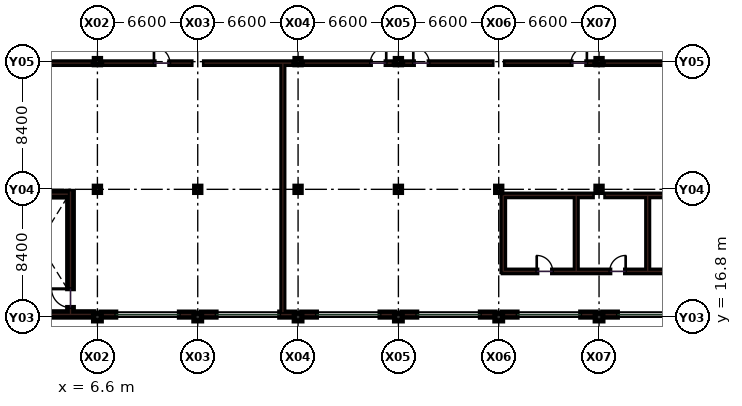
"""IFC4 building model, lengths in metres.
Left out: names, types, materials, properties, quantities, classifications, styles, units other than length and angle.
Written with IfcOpenShell. Run it as: python <this file> out.ifc"""

import sys

from ifc_helpers import new_model, si_unit, direction, frame, frame_2d, origin, origin_2d, place, context, subcontext, project, spatial, rectangle, extrude, element, fill, save


model = new_model("IFC4")
c1 = context("Model", 3, precision=1e-05, world=origin(), true_north=direction((0.0, 1.0)))
c2 = subcontext(c1, "Body", "Model", "MODEL_VIEW")
j1 = project(units=[si_unit("LENGTHUNIT", "METRE"), si_unit("PLANEANGLEUNIT", "RADIAN")], contexts=[c1])
p1 = place(None, origin())
s1 = spatial("IfcSite", under=j1, at=p1, CompositionType="ELEMENT")
p2 = place(p1, origin())
s2 = spatial("IfcBuilding", under=s1, at=p2, CompositionType="ELEMENT")
p3 = place(p2, frame((0.0, 0.0, 9.9)))
s3 = spatial("IfcBuildingStorey", under=s2, at=p3, CompositionType="ELEMENT", Elevation=9.9)
p4 = place(p3, frame((6.6, 16.8, 0.0), z_axis=(0.0, 0.0, 1.0), x_axis=(1.0, 0.0, 0.0)))
e1 = element("IfcColumn", 1, at=p4, inside=s3, PredefinedType="COLUMN", context=c2, shape_type="SweptSolid", body=[
    extrude(rectangle(XDim=0.5, YDim=0.5, at=origin_2d()), origin(), (0.0, 0.0, 1.0), 4.5),
])
for number, where, z_axis, x_axis in (
    (2, (6.6, 25.2, 0.0), (0.0, 0.0, 1.0), (1.0, 0.0, 0.0)),
    (3, (6.6, 33.6, 0.0), (0.0, 0.0, 1.0), (1.0, 0.0, 0.0)),
):
    element("IfcColumn", number, at=place(p3, frame(where, z_axis=z_axis, x_axis=x_axis)), inside=s3, PredefinedType="COLUMN", context=c2, shape_type="SweptSolid", body=[
        extrude(rectangle(XDim=0.4, YDim=0.4, at=origin_2d()), origin(), (0.0, 0.0, 1.0), 4.5),
    ])
p5 = place(p3, frame((13.2, 16.8, 0.0), z_axis=(0.0, 0.0, 1.0), x_axis=(1.0, 0.0, 0.0)))
e4 = element("IfcColumn", 4, at=p5, inside=s3, PredefinedType="COLUMN", context=c2, shape_type="SweptSolid", body=[
    extrude(rectangle(XDim=0.5, YDim=0.5, at=origin_2d()), origin(), (0.0, 0.0, 1.0), 4.5),
])
p6 = place(p3, frame((13.2, 25.2, 0.0), z_axis=(0.0, 0.0, 1.0), x_axis=(1.0, 0.0, 0.0)))
e5 = element("IfcColumn", 5, at=p6, inside=s3, PredefinedType="COLUMN", context=c2, shape_type="SweptSolid", body=[
    extrude(rectangle(XDim=0.4, YDim=0.4, at=origin_2d()), origin(), (0.0, 0.0, 1.0), 4.5),
])
p7 = place(p3, frame((19.8, 16.8, 0.0), z_axis=(0.0, 0.0, 1.0), x_axis=(1.0, 0.0, 0.0)))
e6 = element("IfcColumn", 6, at=p7, inside=s3, PredefinedType="COLUMN", context=c2, shape_type="SweptSolid", body=[
    extrude(rectangle(XDim=0.5, YDim=0.5, at=origin_2d()), origin(), (0.0, 0.0, 1.0), 4.5),
])
for number, where, z_axis, x_axis in (
    (7, (19.8, 25.2, 0.0), (0.0, 0.0, 1.0), (1.0, 0.0, 0.0)),
    (8, (19.8, 33.6, 0.0), (0.0, 0.0, 1.0), (1.0, 0.0, 0.0)),
):
    element("IfcColumn", number, at=place(p3, frame(where, z_axis=z_axis, x_axis=x_axis)), inside=s3, PredefinedType="COLUMN", context=c2, shape_type="SweptSolid", body=[
        extrude(rectangle(XDim=0.4, YDim=0.4, at=origin_2d()), origin(), (0.0, 0.0, 1.0), 4.5),
    ])
p8 = place(p3, frame((26.4, 16.8, 0.0), z_axis=(0.0, 0.0, 1.0), x_axis=(1.0, 0.0, 0.0)))
e9 = element("IfcColumn", 9, at=p8, inside=s3, PredefinedType="COLUMN", context=c2, shape_type="SweptSolid", body=[
    extrude(rectangle(XDim=0.5, YDim=0.5, at=origin_2d()), origin(), (0.0, 0.0, 1.0), 4.5),
])
for number, where, z_axis, x_axis in (
    (10, (26.4, 25.2, 0.0), (0.0, 0.0, 1.0), (1.0, 0.0, 0.0)),
    (11, (26.4, 33.6, 0.0), (0.0, 0.0, 1.0), (1.0, 0.0, 0.0)),
):
    element("IfcColumn", number, at=place(p3, frame(where, z_axis=z_axis, x_axis=x_axis)), inside=s3, PredefinedType="COLUMN", context=c2, shape_type="SweptSolid", body=[
        extrude(rectangle(XDim=0.4, YDim=0.4, at=origin_2d()), origin(), (0.0, 0.0, 1.0), 4.5),
    ])
p9 = place(p3, frame((33.0, 16.8, 0.0), z_axis=(0.0, 0.0, 1.0), x_axis=(1.0, 0.0, 0.0)))
e12 = element("IfcColumn", 12, at=p9, inside=s3, PredefinedType="COLUMN", context=c2, shape_type="SweptSolid", body=[
    extrude(rectangle(XDim=0.5, YDim=0.5, at=origin_2d()), origin(), (0.0, 0.0, 1.0), 4.5),
])
p10 = place(p3, frame((33.0, 25.2, 0.0), z_axis=(0.0, 0.0, 1.0), x_axis=(1.0, 0.0, 0.0)))
e13 = element("IfcColumn", 13, at=p10, inside=s3, PredefinedType="COLUMN", context=c2, shape_type="SweptSolid", body=[
    extrude(rectangle(XDim=0.4, YDim=0.4, at=origin_2d()), origin(), (0.0, 0.0, 1.0), 4.5),
])
p11 = place(p3, frame((39.6, 16.8, 0.0), z_axis=(0.0, 0.0, 1.0), x_axis=(1.0, 0.0, 0.0)))
e14 = element("IfcColumn", 14, at=p11, inside=s3, PredefinedType="COLUMN", context=c2, shape_type="SweptSolid", body=[
    extrude(rectangle(XDim=0.5, YDim=0.5, at=origin_2d()), origin(), (0.0, 0.0, 1.0), 4.5),
])
for number, where, z_axis, x_axis in (
    (15, (39.6, 25.2, 0.0), (0.0, 0.0, 1.0), (1.0, 0.0, 0.0)),
    (16, (39.6, 33.6, 0.0), (0.0, 0.0, 1.0), (1.0, 0.0, 0.0)),
):
    element("IfcColumn", number, at=place(p3, frame(where, z_axis=z_axis, x_axis=x_axis)), inside=s3, PredefinedType="COLUMN", context=c2, shape_type="SweptSolid", body=[
        extrude(rectangle(XDim=0.4, YDim=0.4, at=origin_2d()), origin(), (0.0, 0.0, 1.0), 4.5),
    ])
p12 = place(p3, frame((33.3, 19.8, 0.0), z_axis=(0.0, 0.0, 1.0), x_axis=(1.0, 0.0, 0.0)))
e17 = element("IfcWall", 17, at=p12, inside=s3, PredefinedType="PARTITIONING", context=c2, shape_type="SweptSolid", body=[
    extrude(rectangle(XDim=12.65, YDim=0.16, at=frame_2d((6.325, 0.0))), origin(), (0.0, 0.0, 1.0), 3.49),
])
p13 = place(p12, frame((2.2, 0.0, 0.0)))
e18 = element("IfcOpeningElement", 18, at=p13, cuts=e17, PredefinedType="OPENING", context=c2, shape_type="SweptSolid", body=[
    extrude(rectangle(XDim=1.05, YDim=2.15, at=frame_2d((0.525, 1.075))), frame((0.0, 0.09, 0.0), z_axis=(0.0, -1.0, 0.0), x_axis=(1.0, 0.0, 0.0)), (0.0, 0.0, 1.0), 0.18),
])
p14 = place(p12, frame((7.0, 0.0, 0.0)))
e19 = element("IfcOpeningElement", 19, at=p14, cuts=e17, PredefinedType="OPENING", context=c2, shape_type="SweptSolid", body=[
    extrude(rectangle(XDim=1.05, YDim=2.15, at=frame_2d((0.525, 1.075))), frame((0.0, 0.09, 0.0), z_axis=(0.0, -1.0, 0.0), x_axis=(1.0, 0.0, 0.0)), (0.0, 0.0, 1.0), 0.18),
])
p15 = place(p12, frame((11.1, 0.0, 0.0)))
e20 = element("IfcOpeningElement", 20, at=p15, cuts=e17, PredefinedType="OPENING", context=c2, shape_type="SweptSolid", body=[
    extrude(rectangle(XDim=1.05, YDim=2.15, at=frame_2d((0.525, 1.075))), frame((0.0, 0.09, 0.0), z_axis=(0.0, -1.0, 0.0), x_axis=(1.0, 0.0, 0.0)), (0.0, 0.0, 1.0), 0.18),
])
p16 = place(p3, frame((33.3, 24.8, 0.0), z_axis=(0.0, 0.0, 1.0), x_axis=(1.0, 0.0, 0.0)))
e21 = element("IfcWall", 21, at=p16, inside=s3, PredefinedType="PARTITIONING", context=c2, shape_type="SweptSolid", body=[
    extrude(rectangle(XDim=5.85, YDim=0.16, at=frame_2d((2.925, 0.0))), origin(), (0.0, 0.0, 1.0), 3.49),
])
p17 = place(p3, frame((40.05, 24.8, 0.0), z_axis=(0.0, 0.0, 1.0), x_axis=(1.0, 0.0, 0.0)))
e22 = element("IfcWall", 22, at=p17, inside=s3, PredefinedType="PARTITIONING", context=c2, shape_type="SweptSolid", body=[
    extrude(rectangle(XDim=5.9, YDim=0.16, at=frame_2d((2.95, 0.0))), origin(), (0.0, 0.0, 1.0), 3.49),
])
p18 = place(p3, frame((33.3, 19.8, 0.0), z_axis=(0.0, 0.0, 1.0), x_axis=(0.0, 1.0, 0.0)))
e23 = element("IfcWall", 23, at=p18, inside=s3, PredefinedType="PARTITIONING", context=c2, shape_type="SweptSolid", body=[
    extrude(rectangle(XDim=5.0, YDim=0.16, at=frame_2d((2.5, 0.0))), origin(), (0.0, 0.0, 1.0), 3.49),
])
for number, where, z_axis, x_axis in (
    (24, (38.1, 19.8, 0.0), (0.0, 0.0, 1.0), (0.0, 1.0, 0.0)),
    (25, (42.8, 19.8, 0.0), (0.0, 0.0, 1.0), (0.0, 1.0, 0.0)),
):
    element("IfcWall", number, at=place(p3, frame(where, z_axis=z_axis, x_axis=x_axis)), inside=s3, PredefinedType="PARTITIONING", context=c2, shape_type="SweptSolid", body=[
        extrude(rectangle(XDim=5.0, YDim=0.12, at=frame_2d((2.5, 0.0))), origin(), (0.0, 0.0, 1.0), 3.49),
    ])
p19 = place(p3, frame((18.8, 17.12, 0.0), z_axis=(0.0, 0.0, 1.0), x_axis=(0.0, 1.0, 0.0)))
e26 = element("IfcWall", 26, at=p19, inside=s3, PredefinedType="PARTITIONING", context=c2, shape_type="SweptSolid", body=[
    extrude(rectangle(XDim=16.38, YDim=0.12, at=frame_2d((8.19, 0.0))), origin(), (0.0, 0.0, 1.0), 3.49),
])
p20 = place(p3, frame((0.32, 33.5, 0.0), z_axis=(0.0, 0.0, 1.0), x_axis=(1.0, 0.0, 0.0)))
e27 = element("IfcWall", 27, at=p20, inside=s3, PredefinedType="PARTITIONING", context=c2, shape_type="SweptSolid", body=[
    extrude(rectangle(XDim=5.83, YDim=0.16, at=frame_2d((2.915, 0.0))), origin(), (0.0, 0.0, 1.0), 3.49),
])
p21 = place(p3, frame((7.05, 33.5, 0.0), z_axis=(0.0, 0.0, 1.0), x_axis=(1.0, 0.0, 0.0)))
e28 = element("IfcWall", 28, at=p21, inside=s3, PredefinedType="PARTITIONING", context=c2, shape_type="SweptSolid", body=[
    extrude(rectangle(XDim=5.7, YDim=0.16, at=frame_2d((2.85, 0.0))), origin(), (0.0, 0.0, 1.0), 2.925),
])
p22 = place(p21, frame((3.27, 0.0, 0.0)))
e29 = element("IfcOpeningElement", 29, at=p22, cuts=e28, PredefinedType="OPENING", context=c2, shape_type="SweptSolid", body=[
    extrude(rectangle(XDim=1.05, YDim=2.15, at=frame_2d((0.525, 1.075))), frame((0.0, 0.09, 0.0), z_axis=(0.0, -1.0, 0.0), x_axis=(1.0, 0.0, 0.0)), (0.0, 0.0, 1.0), 0.18),
])
p23 = place(p3, frame((13.65, 33.5, 0.0), z_axis=(0.0, 0.0, 1.0), x_axis=(1.0, 0.0, 0.0)))
e30 = element("IfcWall", 30, at=p23, inside=s3, PredefinedType="PARTITIONING", context=c2, shape_type="SweptSolid", body=[
    extrude(rectangle(XDim=5.7, YDim=0.16, at=frame_2d((2.85, 0.0))), origin(), (0.0, 0.0, 1.0), 2.925),
])
p24 = place(p3, frame((20.25, 33.5, 0.0), z_axis=(0.0, 0.0, 1.0), x_axis=(1.0, 0.0, 0.0)))
e31 = element("IfcWall", 31, at=p24, inside=s3, PredefinedType="PARTITIONING", context=c2, shape_type="SweptSolid", body=[
    extrude(rectangle(XDim=5.7, YDim=0.16, at=frame_2d((2.85, 0.0))), origin(), (0.0, 0.0, 1.0), 3.49),
])
p25 = place(p24, frame((4.3, 0.0, 0.0)))
e32 = element("IfcOpeningElement", 32, at=p25, cuts=e31, PredefinedType="OPENING", context=c2, shape_type="SweptSolid", body=[
    extrude(rectangle(XDim=1.05, YDim=2.15, at=frame_2d((0.525, 1.075))), frame((0.0, 0.09, 0.0), z_axis=(0.0, -1.0, 0.0), x_axis=(1.0, 0.0, 0.0)), (0.0, 0.0, 1.0), 0.18),
])
p26 = place(p3, frame((26.85, 33.5, 0.0), z_axis=(0.0, 0.0, 1.0), x_axis=(1.0, 0.0, 0.0)))
e33 = element("IfcWall", 33, at=p26, inside=s3, PredefinedType="PARTITIONING", context=c2, shape_type="SweptSolid", body=[
    extrude(rectangle(XDim=5.7, YDim=0.16, at=frame_2d((2.85, 0.0))), origin(), (0.0, 0.0, 1.0), 2.925),
])
p27 = place(p26, frame((0.53, 0.0, 0.0)))
e34 = element("IfcOpeningElement", 34, at=p27, cuts=e33, PredefinedType="OPENING", context=c2, shape_type="SweptSolid", body=[
    extrude(rectangle(XDim=1.05, YDim=2.15, at=frame_2d((0.525, 1.075))), frame((0.0, 0.09, 0.0), z_axis=(0.0, -1.0, 0.0), x_axis=(1.0, 0.0, 0.0)), (0.0, 0.0, 1.0), 0.18),
])
p28 = place(p3, frame((33.45, 33.5, 0.0), z_axis=(0.0, 0.0, 1.0), x_axis=(1.0, 0.0, 0.0)))
e35 = element("IfcWall", 35, at=p28, inside=s3, PredefinedType="PARTITIONING", context=c2, shape_type="SweptSolid", body=[
    extrude(rectangle(XDim=5.7, YDim=0.16, at=frame_2d((2.85, 0.0))), origin(), (0.0, 0.0, 1.0), 2.925),
])
p29 = place(p28, frame((4.3, 0.0, 0.0)))
e36 = element("IfcOpeningElement", 36, at=p29, cuts=e35, PredefinedType="OPENING", context=c2, shape_type="SweptSolid", body=[
    extrude(rectangle(XDim=1.05, YDim=2.15, at=frame_2d((0.525, 1.075))), frame((0.0, 0.09, 0.0), z_axis=(0.0, -1.0, 0.0), x_axis=(1.0, 0.0, 0.0)), (0.0, 0.0, 1.0), 0.18),
])
p30 = place(p3, frame((40.05, 33.5, 0.0), z_axis=(0.0, 0.0, 1.0), x_axis=(1.0, 0.0, 0.0)))
e37 = element("IfcWall", 37, at=p30, inside=s3, PredefinedType="PARTITIONING", context=c2, shape_type="SweptSolid", body=[
    extrude(rectangle(XDim=5.83, YDim=0.16, at=frame_2d((2.915, 0.0))), origin(), (0.0, 0.0, 1.0), 3.49),
])
p31 = place(p3, frame((0.245, 16.97, 0.0), z_axis=(0.0, 0.0, 1.0), x_axis=(1.0, 0.0, 0.0)))
e38 = element("IfcWall", 38, at=p31, inside=s3, PredefinedType="SHEAR", context=c2, shape_type="SweptSolid", body=[
    extrude(rectangle(XDim=6.11, YDim=0.34, at=frame_2d((3.055, 0.0))), origin(), (0.0, 0.0, 1.0), 4.24),
])
p32 = place(p3, frame((6.845, 16.96, 0.0), z_axis=(0.0, 0.0, 1.0), x_axis=(1.0, 0.0, 0.0)))
e39 = element("IfcWall", 39, at=p32, inside=s3, PredefinedType="SOLIDWALL", context=c2, shape_type="SweptSolid", body=[
    extrude(rectangle(XDim=6.11, YDim=0.32, at=frame_2d((3.055, 0.0))), origin(), (0.0, 0.0, 1.0), 3.625),
])
p33 = place(p32, frame((0.955, 0.0, 1.45)))
e40 = element("IfcOpeningElement", 40, at=p33, cuts=e39, PredefinedType="OPENING", context=c2, shape_type="SweptSolid", body=[
    extrude(rectangle(XDim=4.2, YDim=1.1, at=frame_2d((2.1, 0.55))), frame((0.0, 0.17, 0.0), z_axis=(0.0, -1.0, 0.0), x_axis=(1.0, 0.0, 0.0)), (0.0, 0.0, 1.0), 0.34),
])
p34 = place(p3, frame((13.445, 16.96, 0.0), z_axis=(0.0, 0.0, 1.0), x_axis=(1.0, 0.0, 0.0)))
e41 = element("IfcWall", 41, at=p34, inside=s3, PredefinedType="SOLIDWALL", context=c2, shape_type="SweptSolid", body=[
    extrude(rectangle(XDim=6.11, YDim=0.32, at=frame_2d((3.055, 0.0))), origin(), (0.0, 0.0, 1.0), 3.625),
])
p35 = place(p34, frame((0.955, 0.0, 1.45)))
e42 = element("IfcOpeningElement", 42, at=p35, cuts=e41, PredefinedType="OPENING", context=c2, shape_type="SweptSolid", body=[
    extrude(rectangle(XDim=4.2, YDim=1.1, at=frame_2d((2.1, 0.55))), frame((0.0, 0.17, 0.0), z_axis=(0.0, -1.0, 0.0), x_axis=(1.0, 0.0, 0.0)), (0.0, 0.0, 1.0), 0.34),
])
p36 = place(p3, frame((20.045, 16.96, 0.0), z_axis=(0.0, 0.0, 1.0), x_axis=(1.0, 0.0, 0.0)))
e43 = element("IfcWall", 43, at=p36, inside=s3, PredefinedType="SOLIDWALL", context=c2, shape_type="SweptSolid", body=[
    extrude(rectangle(XDim=6.11, YDim=0.32, at=frame_2d((3.055, 0.0))), origin(), (0.0, 0.0, 1.0), 3.625),
])
p37 = place(p36, frame((0.955, 0.0, 1.45)))
e44 = element("IfcOpeningElement", 44, at=p37, cuts=e43, PredefinedType="OPENING", context=c2, shape_type="SweptSolid", body=[
    extrude(rectangle(XDim=4.2, YDim=1.1, at=frame_2d((2.1, 0.55))), frame((0.0, 0.17, 0.0), z_axis=(0.0, -1.0, 0.0), x_axis=(1.0, 0.0, 0.0)), (0.0, 0.0, 1.0), 0.34),
])
p38 = place(p3, frame((26.645, 16.96, 0.0), z_axis=(0.0, 0.0, 1.0), x_axis=(1.0, 0.0, 0.0)))
e45 = element("IfcWall", 45, at=p38, inside=s3, PredefinedType="SOLIDWALL", context=c2, shape_type="SweptSolid", body=[
    extrude(rectangle(XDim=6.11, YDim=0.32, at=frame_2d((3.055, 0.0))), origin(), (0.0, 0.0, 1.0), 3.625),
])
p39 = place(p38, frame((0.955, 0.0, 1.45)))
e46 = element("IfcOpeningElement", 46, at=p39, cuts=e45, PredefinedType="OPENING", context=c2, shape_type="SweptSolid", body=[
    extrude(rectangle(XDim=4.2, YDim=1.1, at=frame_2d((2.1, 0.55))), frame((0.0, 0.17, 0.0), z_axis=(0.0, -1.0, 0.0), x_axis=(1.0, 0.0, 0.0)), (0.0, 0.0, 1.0), 0.34),
])
p40 = place(p3, frame((33.245, 16.96, 0.0), z_axis=(0.0, 0.0, 1.0), x_axis=(1.0, 0.0, 0.0)))
e47 = element("IfcWall", 47, at=p40, inside=s3, PredefinedType="SOLIDWALL", context=c2, shape_type="SweptSolid", body=[
    extrude(rectangle(XDim=6.11, YDim=0.32, at=frame_2d((3.055, 0.0))), origin(), (0.0, 0.0, 1.0), 3.625),
])
p41 = place(p40, frame((0.955, 0.0, 1.45)))
e48 = element("IfcOpeningElement", 48, at=p41, cuts=e47, PredefinedType="OPENING", context=c2, shape_type="SweptSolid", body=[
    extrude(rectangle(XDim=4.2, YDim=1.1, at=frame_2d((2.1, 0.55))), frame((0.0, 0.17, 0.0), z_axis=(0.0, -1.0, 0.0), x_axis=(1.0, 0.0, 0.0)), (0.0, 0.0, 1.0), 0.34),
])
p42 = place(p3, frame((39.845, 16.96, 0.0), z_axis=(0.0, 0.0, 1.0), x_axis=(1.0, 0.0, 0.0)))
e49 = element("IfcWall", 49, at=p42, inside=s3, PredefinedType="SOLIDWALL", context=c2, shape_type="SweptSolid", body=[
    extrude(rectangle(XDim=6.11, YDim=0.32, at=frame_2d((3.055, 0.0))), origin(), (0.0, 0.0, 1.0), 3.625),
])
p43 = place(p42, frame((0.955, 0.0, 1.45)))
e50 = element("IfcOpeningElement", 50, at=p43, cuts=e49, PredefinedType="OPENING", context=c2, shape_type="SweptSolid", body=[
    extrude(rectangle(XDim=4.2, YDim=1.1, at=frame_2d((2.1, 0.55))), frame((0.0, 0.17, 0.0), z_axis=(0.0, -1.0, 0.0), x_axis=(1.0, 0.0, 0.0)), (0.0, 0.0, 1.0), 0.34),
])
p44 = place(p3, frame((4.83, 16.97, 0.0), z_axis=(0.0, 0.0, 1.0), x_axis=(0.0, 1.0, 0.0)))
e51 = element("IfcWall", 51, at=p44, inside=s3, PredefinedType="SHEAR", context=c2, shape_type="SweptSolid", body=[
    extrude(rectangle(XDim=8.09, YDim=0.36, at=frame_2d((4.045, 0.0))), origin(), (0.0, 0.0, 1.0), 4.24),
])
p45 = place(p44, frame((0.45, 0.0, 0.0)))
e52 = element("IfcOpeningElement", 52, at=p45, cuts=e51, PredefinedType="OPENING", context=c2, shape_type="SweptSolid", body=[
    extrude(rectangle(XDim=1.25, YDim=2.15, at=frame_2d((0.625, 1.075))), frame((0.0, 0.19, 0.0), z_axis=(0.0, -1.0, 0.0), x_axis=(1.0, 0.0, 0.0)), (0.0, 0.0, 1.0), 0.38),
])
p46 = place(p3, frame((0.85, 24.88, 0.0), z_axis=(0.0, 0.0, 1.0), x_axis=(1.0, 0.0, 0.0)))
e53 = element("IfcWall", 53, at=p46, inside=s3, PredefinedType="SHEAR", context=c2, shape_type="SweptSolid", body=[
    extrude(rectangle(XDim=3.8, YDim=0.36, at=frame_2d((1.9, 0.0))), origin(), (0.0, 0.0, 1.0), 4.24),
])
p47 = place(p13, origin())
e54 = element("IfcDoor", 54, at=p47, inside=s3, OperationType="SINGLE_SWING_LEFT", PredefinedType="DOOR", context=c2, shape_type="SweptSolid", body=[
    extrude(rectangle(XDim=1.05, YDim=2.15, at=frame_2d((0.525, 1.075))), frame((0.0, 0.025, 0.0), z_axis=(0.0, -1.0, 0.0), x_axis=(1.0, 0.0, 0.0)), (0.0, 0.0, 1.0), 0.05),
])
fill(e18, e54)
p48 = place(p14, origin())
e55 = element("IfcDoor", 55, at=p48, inside=s3, OperationType="SINGLE_SWING_RIGHT", PredefinedType="DOOR", context=c2, shape_type="SweptSolid", body=[
    extrude(rectangle(XDim=1.05, YDim=2.15, at=frame_2d((0.525, 1.075))), frame((0.0, 0.025, 0.0), z_axis=(0.0, -1.0, 0.0), x_axis=(1.0, 0.0, 0.0)), (0.0, 0.0, 1.0), 0.05),
])
fill(e19, e55)
p49 = place(p22, origin())
e56 = element("IfcDoor", 56, at=p49, inside=s3, OperationType="SINGLE_SWING_LEFT", PredefinedType="DOOR", context=c2, shape_type="SweptSolid", body=[
    extrude(rectangle(XDim=1.05, YDim=2.15, at=frame_2d((0.525, 1.075))), frame((0.0, 0.025, 0.0), z_axis=(0.0, -1.0, 0.0), x_axis=(1.0, 0.0, 0.0)), (0.0, 0.0, 1.0), 0.05),
])
fill(e29, e56)
p50 = place(p25, origin())
e57 = element("IfcDoor", 57, at=p50, inside=s3, OperationType="SINGLE_SWING_RIGHT", PredefinedType="DOOR", context=c2, shape_type="SweptSolid", body=[
    extrude(rectangle(XDim=1.05, YDim=2.15, at=frame_2d((0.525, 1.075))), frame((0.0, 0.025, 0.0), z_axis=(0.0, -1.0, 0.0), x_axis=(1.0, 0.0, 0.0)), (0.0, 0.0, 1.0), 0.05),
])
fill(e32, e57)
p51 = place(p27, origin())
e58 = element("IfcDoor", 58, at=p51, inside=s3, OperationType="SINGLE_SWING_LEFT", PredefinedType="DOOR", context=c2, shape_type="SweptSolid", body=[
    extrude(rectangle(XDim=1.05, YDim=2.15, at=frame_2d((0.525, 1.075))), frame((0.0, 0.025, 0.0), z_axis=(0.0, -1.0, 0.0), x_axis=(1.0, 0.0, 0.0)), (0.0, 0.0, 1.0), 0.05),
])
fill(e34, e58)
p52 = place(p29, origin())
e59 = element("IfcDoor", 59, at=p52, inside=s3, OperationType="SINGLE_SWING_RIGHT", PredefinedType="DOOR", context=c2, shape_type="SweptSolid", body=[
    extrude(rectangle(XDim=1.05, YDim=2.15, at=frame_2d((0.525, 1.075))), frame((0.0, 0.025, 0.0), z_axis=(0.0, -1.0, 0.0), x_axis=(1.0, 0.0, 0.0)), (0.0, 0.0, 1.0), 0.05),
])
fill(e36, e59)
p53 = place(p33, origin())
e60 = element("IfcWindow", 60, at=p53, inside=s3, PartitioningType="SINGLE_PANEL", PredefinedType="WINDOW", context=c2, shape_type="SweptSolid", body=[
    extrude(rectangle(XDim=4.2, YDim=1.1, at=frame_2d((2.1, 0.55))), frame((0.0, 0.03, 0.0), z_axis=(0.0, -1.0, 0.0), x_axis=(1.0, 0.0, 0.0)), (0.0, 0.0, 1.0), 0.06),
])
fill(e40, e60)
p54 = place(p35, origin())
e61 = element("IfcWindow", 61, at=p54, inside=s3, PartitioningType="SINGLE_PANEL", PredefinedType="WINDOW", context=c2, shape_type="SweptSolid", body=[
    extrude(rectangle(XDim=4.2, YDim=1.1, at=frame_2d((2.1, 0.55))), frame((0.0, 0.03, 0.0), z_axis=(0.0, -1.0, 0.0), x_axis=(1.0, 0.0, 0.0)), (0.0, 0.0, 1.0), 0.06),
])
fill(e42, e61)
p55 = place(p37, origin())
e62 = element("IfcWindow", 62, at=p55, inside=s3, PartitioningType="SINGLE_PANEL", PredefinedType="WINDOW", context=c2, shape_type="SweptSolid", body=[
    extrude(rectangle(XDim=4.2, YDim=1.1, at=frame_2d((2.1, 0.55))), frame((0.0, 0.03, 0.0), z_axis=(0.0, -1.0, 0.0), x_axis=(1.0, 0.0, 0.0)), (0.0, 0.0, 1.0), 0.06),
])
fill(e44, e62)
p56 = place(p39, origin())
e63 = element("IfcWindow", 63, at=p56, inside=s3, PartitioningType="SINGLE_PANEL", PredefinedType="WINDOW", context=c2, shape_type="SweptSolid", body=[
    extrude(rectangle(XDim=4.2, YDim=1.1, at=frame_2d((2.1, 0.55))), frame((0.0, 0.03, 0.0), z_axis=(0.0, -1.0, 0.0), x_axis=(1.0, 0.0, 0.0)), (0.0, 0.0, 1.0), 0.06),
])
fill(e46, e63)
p57 = place(p41, origin())
e64 = element("IfcWindow", 64, at=p57, inside=s3, PartitioningType="SINGLE_PANEL", PredefinedType="WINDOW", context=c2, shape_type="SweptSolid", body=[
    extrude(rectangle(XDim=4.2, YDim=1.1, at=frame_2d((2.1, 0.55))), frame((0.0, 0.03, 0.0), z_axis=(0.0, -1.0, 0.0), x_axis=(1.0, 0.0, 0.0)), (0.0, 0.0, 1.0), 0.06),
])
fill(e48, e64)
p58 = place(p43, origin())
e65 = element("IfcWindow", 65, at=p58, inside=s3, PartitioningType="SINGLE_PANEL", PredefinedType="WINDOW", context=c2, shape_type="SweptSolid", body=[
    extrude(rectangle(XDim=4.2, YDim=1.1, at=frame_2d((2.1, 0.55))), frame((0.0, 0.03, 0.0), z_axis=(0.0, -1.0, 0.0), x_axis=(1.0, 0.0, 0.0)), (0.0, 0.0, 1.0), 0.06),
])
fill(e50, e65)
p59 = place(p45, origin())
e66 = element("IfcDoor", 66, at=p59, inside=s3, OperationType="SINGLE_SWING_RIGHT", PredefinedType="DOOR", context=c2, shape_type="SweptSolid", body=[
    extrude(rectangle(XDim=1.25, YDim=2.15, at=frame_2d((0.625, 1.075))), frame((0.0, 0.025, 0.0), z_axis=(0.0, -1.0, 0.0), x_axis=(1.0, 0.0, 0.0)), (0.0, 0.0, 1.0), 0.05),
])
fill(e52, e66)
save(model, sys.argv[1])
